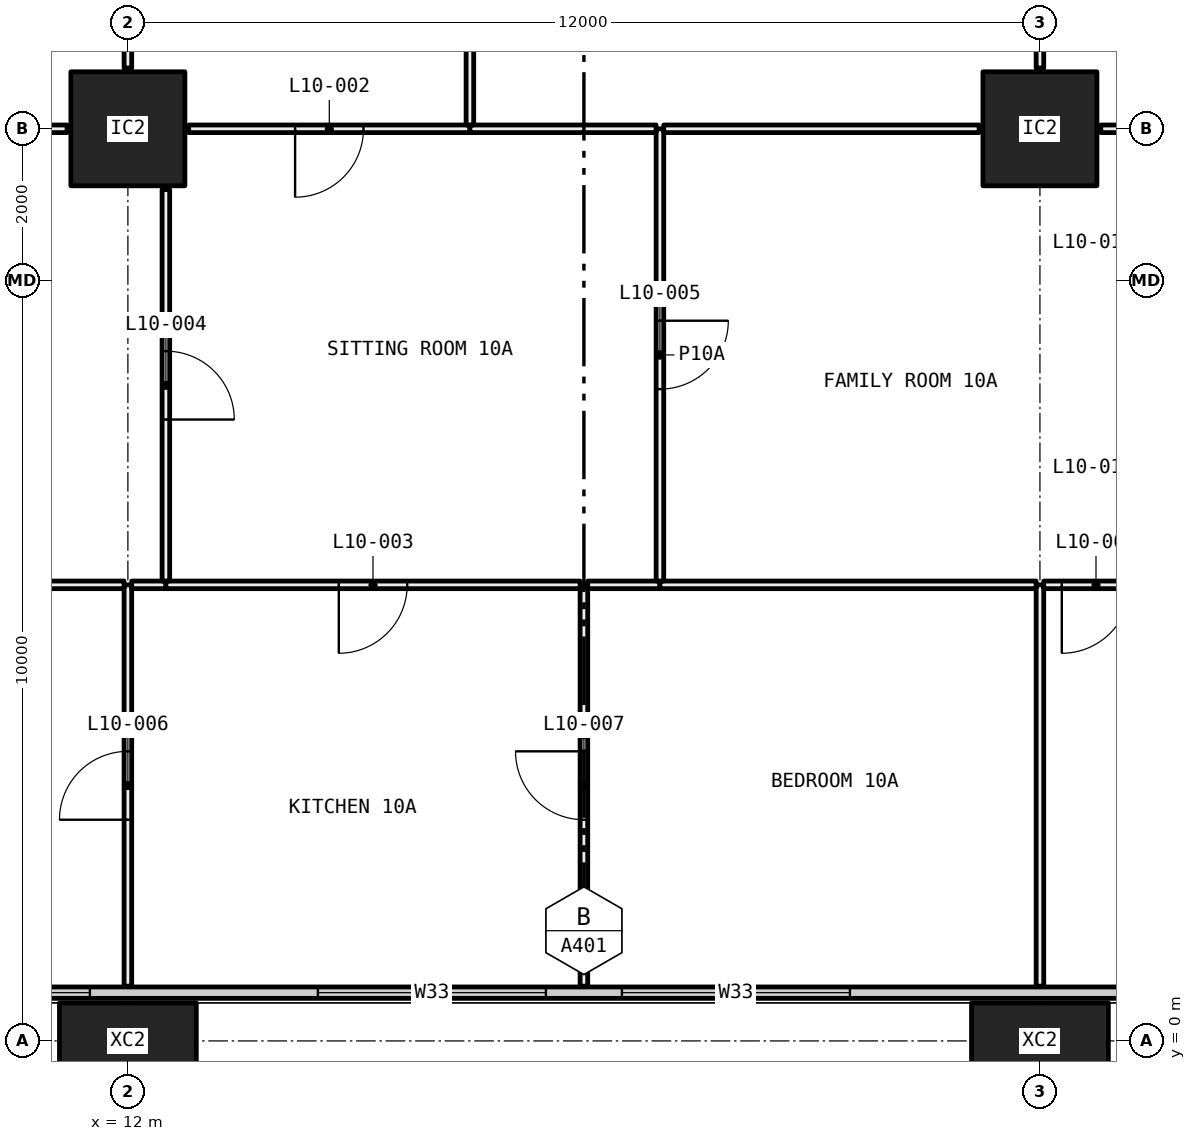
"""IFC4 building model, lengths in metres.
Left out: names, types, materials, properties, quantities, classifications, styles, units other than length and angle.
Written with IfcOpenShell. Run it as: python <this file> out.ifc"""

import sys

from ifc_helpers import new_model, si_unit, direction, frame, frame_2d, origin, origin_2d, place, context, subcontext, project, spatial, rectangle, hollow_rectangle, extrude, element, fill, save


model = new_model("IFC4")
c1 = context("Model", 3, precision=1e-05, world=origin(), true_north=direction((0.0, 1.0)))
c2 = subcontext(c1, "Body", "Model", "MODEL_VIEW")
j1 = project(units=[si_unit("LENGTHUNIT", "METRE"), si_unit("PLANEANGLEUNIT", "RADIAN")], contexts=[c1])
p1 = place(None, origin())
s1 = spatial("IfcSite", under=j1, at=p1, CompositionType="ELEMENT")
p2 = place(p1, origin())
s2 = spatial("IfcBuilding", under=s1, at=p2, CompositionType="ELEMENT")
p3 = place(p2, frame((0.0, 0.0, 47.25)))
s3 = spatial("IfcBuildingStorey", under=s2, at=p3, CompositionType="ELEMENT", Elevation=47.25)
p4 = place(p3, frame((12.0, 0.0, -0.4), z_axis=(0.0, 0.0, 1.0), x_axis=(1.0, 0.0, 0.0)))
e1 = element("IfcColumn", 1, at=p4, inside=s3, PredefinedType="COLUMN", context=c2, shape_type="SweptSolid", body=[
    extrude(hollow_rectangle(XDim=1.8, YDim=1.0, WallThickness=0.07, at=origin_2d()), origin(), (0.0, 0.0, 1.0), 3.45),
])
p5 = place(p3, frame((12.0, 12.0, 0.0), z_axis=(0.0, 0.0, 1.0), x_axis=(1.0, 0.0, 0.0)))
e2 = element("IfcColumn", 2, at=p5, inside=s3, PredefinedType="COLUMN", context=c2, shape_type="SweptSolid", body=[
    extrude(hollow_rectangle(XDim=1.5, YDim=1.5, WallThickness=0.065, at=origin_2d()), origin(), (0.0, 0.0, 1.0), 3.05),
])
p6 = place(p3, frame((24.0, 0.0, -0.4), z_axis=(0.0, 0.0, 1.0), x_axis=(1.0, 0.0, 0.0)))
e3 = element("IfcColumn", 3, at=p6, inside=s3, PredefinedType="COLUMN", context=c2, shape_type="SweptSolid", body=[
    extrude(hollow_rectangle(XDim=1.8, YDim=1.0, WallThickness=0.07, at=origin_2d()), origin(), (0.0, 0.0, 1.0), 3.45),
])
p7 = place(p3, frame((24.0, 12.0, 0.0), z_axis=(0.0, 0.0, 1.0), x_axis=(1.0, 0.0, 0.0)))
e4 = element("IfcColumn", 4, at=p7, inside=s3, PredefinedType="COLUMN", context=c2, shape_type="SweptSolid", body=[
    extrude(hollow_rectangle(XDim=1.5, YDim=1.5, WallThickness=0.065, at=origin_2d()), origin(), (0.0, 0.0, 1.0), 3.05),
])
p8 = place(p3, frame((6.56, 0.635, 0.0), z_axis=(0.0, 0.0, 1.0), x_axis=(1.0, 0.0, 0.0)))
e5 = element("IfcWall", 5, at=p8, inside=s3, PredefinedType="ELEMENTEDWALL", context=c2, shape_type="SweptSolid", body=[
    extrude(rectangle(XDim=58.88, YDim=0.15, at=frame_2d((29.44, 0.0))), origin(), (0.0, 0.0, 1.0), 3.05),
])
p9 = place(p8, frame((0.44, 0.0, 0.45)))
e6 = element("IfcOpeningElement", 6, at=p9, cuts=e5, PredefinedType="OPENING", context=c2, shape_type="SweptSolid", body=[
    extrude(rectangle(XDim=4.5, YDim=2.55, at=frame_2d((2.25, 1.275))), frame((0.0, 0.085, 0.0), z_axis=(0.0, -1.0, 0.0), x_axis=(1.0, 0.0, 0.0)), (0.0, 0.0, 1.0), 0.17),
])
p10 = place(p8, frame((7.94, 0.0, 0.45)))
e7 = element("IfcOpeningElement", 7, at=p10, cuts=e5, PredefinedType="OPENING", context=c2, shape_type="SweptSolid", body=[
    extrude(rectangle(XDim=3.0, YDim=2.55, at=frame_2d((1.5, 1.275))), frame((0.0, 0.085, 0.0), z_axis=(0.0, -1.0, 0.0), x_axis=(1.0, 0.0, 0.0)), (0.0, 0.0, 1.0), 0.17),
])
p11 = place(p8, frame((11.94, 0.0, 0.45)))
e8 = element("IfcOpeningElement", 8, at=p11, cuts=e5, PredefinedType="OPENING", context=c2, shape_type="SweptSolid", body=[
    extrude(rectangle(XDim=3.0, YDim=2.55, at=frame_2d((1.5, 1.275))), frame((0.0, 0.085, 0.0), z_axis=(0.0, -1.0, 0.0), x_axis=(1.0, 0.0, 0.0)), (0.0, 0.0, 1.0), 0.17),
])
p12 = place(p8, frame((19.94, 0.0, 0.45)))
e9 = element("IfcOpeningElement", 9, at=p12, cuts=e5, PredefinedType="OPENING", context=c2, shape_type="SweptSolid", body=[
    extrude(rectangle(XDim=3.0, YDim=2.55, at=frame_2d((1.5, 1.275))), frame((0.0, 0.085, 0.0), z_axis=(0.0, -1.0, 0.0), x_axis=(1.0, 0.0, 0.0)), (0.0, 0.0, 1.0), 0.17),
])
p13 = place(p8, frame((23.94, 0.0, 0.45)))
e10 = element("IfcOpeningElement", 10, at=p13, cuts=e5, PredefinedType="OPENING", context=c2, shape_type="SweptSolid", body=[
    extrude(rectangle(XDim=2.0, YDim=2.55, at=frame_2d((1.0, 1.275))), frame((0.0, 0.085, 0.0), z_axis=(0.0, -1.0, 0.0), x_axis=(1.0, 0.0, 0.0)), (0.0, 0.0, 1.0), 0.17),
])
p14 = place(p8, frame((31.94, 0.0, 0.45)))
e11 = element("IfcOpeningElement", 11, at=p14, cuts=e5, PredefinedType="OPENING", context=c2, shape_type="SweptSolid", body=[
    extrude(rectangle(XDim=3.0, YDim=2.55, at=frame_2d((1.5, 1.275))), frame((0.0, 0.085, 0.0), z_axis=(0.0, -1.0, 0.0), x_axis=(1.0, 0.0, 0.0)), (0.0, 0.0, 1.0), 0.17),
])
p15 = place(p8, frame((35.94, 0.0, 0.45)))
e12 = element("IfcOpeningElement", 12, at=p15, cuts=e5, PredefinedType="OPENING", context=c2, shape_type="SweptSolid", body=[
    extrude(rectangle(XDim=3.0, YDim=2.55, at=frame_2d((1.5, 1.275))), frame((0.0, 0.085, 0.0), z_axis=(0.0, -1.0, 0.0), x_axis=(1.0, 0.0, 0.0)), (0.0, 0.0, 1.0), 0.17),
])
p16 = place(p8, frame((43.94, 0.0, 0.45)))
e13 = element("IfcOpeningElement", 13, at=p16, cuts=e5, PredefinedType="OPENING", context=c2, shape_type="SweptSolid", body=[
    extrude(rectangle(XDim=3.0, YDim=2.55, at=frame_2d((1.5, 1.275))), frame((0.0, 0.085, 0.0), z_axis=(0.0, -1.0, 0.0), x_axis=(1.0, 0.0, 0.0)), (0.0, 0.0, 1.0), 0.17),
])
p17 = place(p8, frame((47.94, 0.0, 0.45)))
e14 = element("IfcOpeningElement", 14, at=p17, cuts=e5, PredefinedType="OPENING", context=c2, shape_type="SweptSolid", body=[
    extrude(rectangle(XDim=2.0, YDim=2.55, at=frame_2d((1.0, 1.275))), frame((0.0, 0.085, 0.0), z_axis=(0.0, -1.0, 0.0), x_axis=(1.0, 0.0, 0.0)), (0.0, 0.0, 1.0), 0.17),
])
p18 = place(p8, frame((53.94, 0.0, 0.45)))
e15 = element("IfcOpeningElement", 15, at=p18, cuts=e5, PredefinedType="OPENING", context=c2, shape_type="SweptSolid", body=[
    extrude(rectangle(XDim=4.5, YDim=2.55, at=frame_2d((2.25, 1.275))), frame((0.0, 0.085, 0.0), z_axis=(0.0, -1.0, 0.0), x_axis=(1.0, 0.0, 0.0)), (0.0, 0.0, 1.0), 0.17),
])
p19 = place(p3, frame((12.0, 0.72, 0.0), z_axis=(0.0, 0.0, 1.0), x_axis=(0.0, 1.0, 0.0)))
e16 = element("IfcWall", 16, at=p19, inside=s3, PredefinedType="PARTITIONING", context=c2, shape_type="SweptSolid", body=[
    extrude(rectangle(XDim=5.28, YDim=0.1, at=frame_2d((2.64, 0.0))), origin(), (0.0, 0.0, 1.0), 2.45),
])
p20 = place(p19, frame((2.19, 0.0, 0.0)))
e17 = element("IfcOpeningElement", 17, at=p20, cuts=e16, PredefinedType="OPENING", context=c2, shape_type="SweptSolid", body=[
    extrude(rectangle(XDim=0.9, YDim=2.1, at=frame_2d((0.45, 1.05))), frame((0.0, 0.06, 0.0), z_axis=(0.0, -1.0, 0.0), x_axis=(1.0, 0.0, 0.0)), (0.0, 0.0, 1.0), 0.12),
])
p21 = place(p3, frame((11.95, 6.0, 0.0), z_axis=(0.0, 0.0, 1.0), x_axis=(-1.0, 0.0, 0.0)))
e18 = element("IfcWall", 18, at=p21, inside=s3, PredefinedType="PARTITIONING", context=c2, shape_type="SweptSolid", body=[
    extrude(rectangle(XDim=5.23, YDim=0.1, at=frame_2d((2.615, 0.0))), origin(), (0.0, 0.0, 1.0), 2.45),
])
p22 = place(p3, frame((18.0, 0.72, 0.0), z_axis=(0.0, 0.0, 1.0), x_axis=(0.0, 1.0, 0.0)))
e19 = element("IfcWall", 19, at=p22, inside=s3, PredefinedType="PARTITIONING", context=c2, shape_type="SweptSolid", body=[
    extrude(rectangle(XDim=5.28, YDim=0.1, at=frame_2d((2.64, 0.0))), origin(), (0.0, 0.0, 1.0), 3.05),
])
p23 = place(p22, frame((2.19, 0.0, 0.0)))
e20 = element("IfcOpeningElement", 20, at=p23, cuts=e19, PredefinedType="OPENING", context=c2, shape_type="SweptSolid", body=[
    extrude(rectangle(XDim=0.9, YDim=2.1, at=frame_2d((0.45, 1.05))), frame((0.0, 0.06, 0.0), z_axis=(0.0, -1.0, 0.0), x_axis=(1.0, 0.0, 0.0)), (0.0, 0.0, 1.0), 0.12),
])
p24 = place(p3, frame((12.5, 6.0, 0.0), z_axis=(0.0, 0.0, 1.0), x_axis=(-1.0, 0.0, 0.0)))
e21 = element("IfcWall", 21, at=p24, inside=s3, PredefinedType="PARTITIONING", context=c2, shape_type="SweptSolid", body=[
    extrude(rectangle(XDim=0.45, YDim=0.1, at=frame_2d((0.225, 0.0))), origin(), (0.0, 0.0, 1.0), 2.45),
])
p25 = place(p3, frame((17.95, 6.0, 0.0), z_axis=(0.0, 0.0, 1.0), x_axis=(-1.0, 0.0, 0.0)))
e22 = element("IfcWall", 22, at=p25, inside=s3, PredefinedType="PARTITIONING", context=c2, shape_type="SweptSolid", body=[
    extrude(rectangle(XDim=5.45, YDim=0.1, at=frame_2d((2.725, 0.0))), origin(), (0.0, 0.0, 1.0), 3.05),
])
p26 = place(p25, frame((2.275, 0.0, 0.0)))
e23 = element("IfcOpeningElement", 23, at=p26, cuts=e22, PredefinedType="OPENING", context=c2, shape_type="SweptSolid", body=[
    extrude(rectangle(XDim=0.9, YDim=2.1, at=frame_2d((0.45, 1.05))), frame((0.0, 0.06, 0.0), z_axis=(0.0, -1.0, 0.0), x_axis=(1.0, 0.0, 0.0)), (0.0, 0.0, 1.0), 0.12),
])
p27 = place(p3, frame((24.0, 0.72, 0.0), z_axis=(0.0, 0.0, 1.0), x_axis=(0.0, 1.0, 0.0)))
e24 = element("IfcWall", 24, at=p27, inside=s3, PredefinedType="PARTITIONING", context=c2, shape_type="SweptSolid", body=[
    extrude(rectangle(XDim=5.28, YDim=0.1, at=frame_2d((2.64, 0.0))), origin(), (0.0, 0.0, 1.0), 2.45),
])
p28 = place(p3, frame((19.0, 6.0, 0.0), z_axis=(0.0, 0.0, 1.0), x_axis=(-1.0, 0.0, 0.0)))
e25 = element("IfcWall", 25, at=p28, inside=s3, PredefinedType="PARTITIONING", context=c2, shape_type="SweptSolid", body=[
    extrude(rectangle(XDim=0.95, YDim=0.1, at=frame_2d((0.475, 0.0))), origin(), (0.0, 0.0, 1.0), 3.05),
])
p29 = place(p3, frame((23.95, 6.0, 0.0), z_axis=(0.0, 0.0, 1.0), x_axis=(-1.0, 0.0, 0.0)))
e26 = element("IfcWall", 26, at=p29, inside=s3, PredefinedType="PARTITIONING", context=c2, shape_type="SweptSolid", body=[
    extrude(rectangle(XDim=4.95, YDim=0.1, at=frame_2d((2.475, 0.0))), origin(), (0.0, 0.0, 1.0), 2.45),
])
p30 = place(p3, frame((25.425, 6.0, 0.0), z_axis=(0.0, 0.0, 1.0), x_axis=(-1.0, 0.0, 0.0)))
e27 = element("IfcWall", 27, at=p30, inside=s3, PredefinedType="PARTITIONING", context=c2, shape_type="SweptSolid", body=[
    extrude(rectangle(XDim=1.375, YDim=0.1, at=frame_2d((0.688, 0.0))), origin(), (0.0, 0.0, 1.0), 2.45),
])
p31 = place(p30, frame((0.238, 0.0, 0.0)))
e28 = element("IfcOpeningElement", 28, at=p31, cuts=e27, PredefinedType="OPENING", context=c2, shape_type="SweptSolid", body=[
    extrude(rectangle(XDim=0.9, YDim=2.1, at=frame_2d((0.45, 1.05))), frame((0.0, 0.06, 0.0), z_axis=(0.0, -1.0, 0.0), x_axis=(1.0, 0.0, 0.0)), (0.0, 0.0, 1.0), 0.12),
])
p32 = place(p3, frame((12.5, 6.05, 0.0), z_axis=(0.0, 0.0, 1.0), x_axis=(0.0, 1.0, 0.0)))
e29 = element("IfcWall", 29, at=p32, inside=s3, PredefinedType="PARTITIONING", context=c2, shape_type="SweptSolid", body=[
    extrude(rectangle(XDim=5.15, YDim=0.1, at=frame_2d((2.575, 0.0))), origin(), (0.0, 0.0, 1.0), 3.05),
])
p33 = place(p32, frame((2.125, 0.0, 0.0)))
e30 = element("IfcOpeningElement", 30, at=p33, cuts=e29, PredefinedType="OPENING", context=c2, shape_type="SweptSolid", body=[
    extrude(rectangle(XDim=0.9, YDim=2.1, at=frame_2d((0.45, 1.05))), frame((0.0, 0.06, 0.0), z_axis=(0.0, -1.0, 0.0), x_axis=(1.0, 0.0, 0.0)), (0.0, 0.0, 1.0), 0.12),
])
p34 = place(p3, frame((11.2, 12.0, 0.0), z_axis=(0.0, 0.0, 1.0), x_axis=(-1.0, 0.0, 0.0)))
e31 = element("IfcWall", 31, at=p34, inside=s3, PredefinedType="PARTITIONING", context=c2, shape_type="SweptSolid", body=[
    extrude(rectangle(XDim=5.15, YDim=0.1, at=frame_2d((2.575, 0.0))), origin(), (0.0, 0.0, 1.0), 2.45),
])
p35 = place(p34, frame((2.125, 0.0, 0.0)))
e32 = element("IfcOpeningElement", 32, at=p35, cuts=e31, PredefinedType="OPENING", context=c2, shape_type="SweptSolid", body=[
    extrude(rectangle(XDim=0.9, YDim=2.1, at=frame_2d((0.45, 1.05))), frame((0.0, 0.06, 0.0), z_axis=(0.0, -1.0, 0.0), x_axis=(1.0, 0.0, 0.0)), (0.0, 0.0, 1.0), 0.12),
])
p36 = place(p3, frame((19.0, 6.05, 0.0), z_axis=(0.0, 0.0, 1.0), x_axis=(0.0, 1.0, 0.0)))
e33 = element("IfcWall", 33, at=p36, inside=s3, PredefinedType="PARTITIONING", context=c2, shape_type="SweptSolid", body=[
    extrude(rectangle(XDim=5.95, YDim=0.1, at=frame_2d((2.975, 0.0))), origin(), (0.0, 0.0, 1.0), 2.45),
])
p37 = place(p36, frame((2.525, 0.0, 0.0)))
e34 = element("IfcOpeningElement", 34, at=p37, cuts=e33, PredefinedType="OPENING", context=c2, shape_type="SweptSolid", body=[
    extrude(rectangle(XDim=0.9, YDim=2.1, at=frame_2d((0.45, 1.05))), frame((0.0, 0.06, 0.0), z_axis=(0.0, -1.0, 0.0), x_axis=(1.0, 0.0, 0.0)), (0.0, 0.0, 1.0), 0.12),
])
p38 = place(p3, frame((16.5, 12.0, 0.0), z_axis=(0.0, 0.0, 1.0), x_axis=(-1.0, 0.0, 0.0)))
e35 = element("IfcWall", 35, at=p38, inside=s3, PredefinedType="PARTITIONING", context=c2, shape_type="SweptSolid", body=[
    extrude(rectangle(XDim=3.7, YDim=0.1, at=frame_2d((1.85, 0.0))), origin(), (0.0, 0.0, 1.0), 2.45),
])
p39 = place(p38, frame((1.4, 0.0, 0.0)))
e36 = element("IfcOpeningElement", 36, at=p39, cuts=e35, PredefinedType="OPENING", context=c2, shape_type="SweptSolid", body=[
    extrude(rectangle(XDim=0.9, YDim=2.1, at=frame_2d((0.45, 1.05))), frame((0.0, 0.06, 0.0), z_axis=(0.0, -1.0, 0.0), x_axis=(1.0, 0.0, 0.0)), (0.0, 0.0, 1.0), 0.12),
])
p40 = place(p3, frame((18.95, 12.0, 0.0), z_axis=(0.0, 0.0, 1.0), x_axis=(-1.0, 0.0, 0.0)))
e37 = element("IfcWall", 37, at=p40, inside=s3, PredefinedType="PARTITIONING", context=c2, shape_type="SweptSolid", body=[
    extrude(rectangle(XDim=2.45, YDim=0.1, at=frame_2d((1.225, 0.0))), origin(), (0.0, 0.0, 1.0), 2.45),
])
p41 = place(p3, frame((23.2, 12.0, 0.0), z_axis=(0.0, 0.0, 1.0), x_axis=(-1.0, 0.0, 0.0)))
e38 = element("IfcWall", 38, at=p41, inside=s3, PredefinedType="PARTITIONING", context=c2, shape_type="SweptSolid", body=[
    extrude(rectangle(XDim=4.15, YDim=0.1, at=frame_2d((2.075, 0.0))), origin(), (0.0, 0.0, 1.0), 2.45),
])
p42 = place(p3, frame((25.425, 12.0, 0.0), z_axis=(0.0, 0.0, 1.0), x_axis=(-1.0, 0.0, 0.0)))
e39 = element("IfcWall", 39, at=p42, inside=s3, PredefinedType="PARTITIONING", context=c2, shape_type="SweptSolid", body=[
    extrude(rectangle(XDim=0.625, YDim=0.1, at=frame_2d((0.312, 0.0))), origin(), (0.0, 0.0, 1.0), 2.45),
])
p43 = place(p3, frame((12.0, 12.8, 0.0), z_axis=(0.0, 0.0, 1.0), x_axis=(0.0, 1.0, 0.0)))
e40 = element("IfcWall", 40, at=p43, inside=s3, PredefinedType="PARTITIONING", context=c2, shape_type="SweptSolid", body=[
    extrude(rectangle(XDim=5.1, YDim=0.1, at=frame_2d((2.55, 0.0))), origin(), (0.0, 0.0, 1.0), 3.05),
])
p44 = place(p3, frame((16.5, 12.05, 0.0), z_axis=(0.0, 0.0, 1.0), x_axis=(0.0, 1.0, 0.0)))
e41 = element("IfcWall", 41, at=p44, inside=s3, PredefinedType="PARTITIONING", context=c2, shape_type="SweptSolid", body=[
    extrude(rectangle(XDim=5.85, YDim=0.1, at=frame_2d((2.925, 0.0))), origin(), (0.0, 0.0, 1.0), 2.45),
])
p45 = place(p44, frame((2.475, 0.0, 0.0)))
e42 = element("IfcOpeningElement", 42, at=p45, cuts=e41, PredefinedType="OPENING", context=c2, shape_type="SweptSolid", body=[
    extrude(rectangle(XDim=0.9, YDim=2.1, at=frame_2d((0.45, 1.05))), frame((0.0, 0.06, 0.0), z_axis=(0.0, -1.0, 0.0), x_axis=(1.0, 0.0, 0.0)), (0.0, 0.0, 1.0), 0.12),
])
p46 = place(p3, frame((24.0, 12.8, 0.0), z_axis=(0.0, 0.0, 1.0), x_axis=(0.0, 1.0, 0.0)))
e43 = element("IfcWall", 43, at=p46, inside=s3, PredefinedType="PARTITIONING", context=c2, shape_type="SweptSolid", body=[
    extrude(rectangle(XDim=5.1, YDim=0.1, at=frame_2d((2.55, 0.0))), origin(), (0.0, 0.0, 1.0), 3.05),
])
p47 = place(p46, frame((2.1, 0.0, 0.0)))
e44 = element("IfcOpeningElement", 44, at=p47, cuts=e43, PredefinedType="OPENING", context=c2, shape_type="SweptSolid", body=[
    extrude(rectangle(XDim=0.9, YDim=2.1, at=frame_2d((0.45, 1.05))), frame((0.0, 0.06, 0.0), z_axis=(0.0, -1.0, 0.0), x_axis=(1.0, 0.0, 0.0)), (0.0, 0.0, 1.0), 0.12),
])
p48 = place(p9, origin())
e45 = element("IfcWindow", 45, at=p48, inside=s3, PartitioningType="SINGLE_PANEL", PredefinedType="WINDOW", context=c2, shape_type="SweptSolid", body=[
    extrude(rectangle(XDim=4.5, YDim=2.55, at=frame_2d((2.25, 1.275))), frame((0.0, 0.03, 0.0), z_axis=(0.0, -1.0, 0.0), x_axis=(1.0, 0.0, 0.0)), (0.0, 0.0, 1.0), 0.06),
])
fill(e6, e45)
p49 = place(p10, origin())
e46 = element("IfcWindow", 46, at=p49, inside=s3, PartitioningType="SINGLE_PANEL", PredefinedType="WINDOW", context=c2, shape_type="SweptSolid", body=[
    extrude(rectangle(XDim=3.0, YDim=2.55, at=frame_2d((1.5, 1.275))), frame((0.0, 0.03, 0.0), z_axis=(0.0, -1.0, 0.0), x_axis=(1.0, 0.0, 0.0)), (0.0, 0.0, 1.0), 0.06),
])
fill(e7, e46)
p50 = place(p11, origin())
e47 = element("IfcWindow", 47, at=p50, inside=s3, PartitioningType="SINGLE_PANEL", PredefinedType="WINDOW", context=c2, shape_type="SweptSolid", body=[
    extrude(rectangle(XDim=3.0, YDim=2.55, at=frame_2d((1.5, 1.275))), frame((0.0, 0.03, 0.0), z_axis=(0.0, -1.0, 0.0), x_axis=(1.0, 0.0, 0.0)), (0.0, 0.0, 1.0), 0.06),
])
fill(e8, e47)
p51 = place(p39, origin())
e48 = element("IfcDoor", 48, at=p51, inside=s3, OperationType="SINGLE_SWING_LEFT", PredefinedType="DOOR", context=c2, shape_type="SweptSolid", body=[
    extrude(rectangle(XDim=0.9, YDim=2.1, at=frame_2d((0.45, 1.05))), frame((0.0, 0.025, 0.0), z_axis=(0.0, -1.0, 0.0), x_axis=(1.0, 0.0, 0.0)), (0.0, 0.0, 1.0), 0.05),
])
fill(e36, e48)
p52 = place(p26, origin())
e49 = element("IfcDoor", 49, at=p52, inside=s3, OperationType="SINGLE_SWING_LEFT", PredefinedType="DOOR", context=c2, shape_type="SweptSolid", body=[
    extrude(rectangle(XDim=0.9, YDim=2.1, at=frame_2d((0.45, 1.05))), frame((0.0, 0.025, 0.0), z_axis=(0.0, -1.0, 0.0), x_axis=(1.0, 0.0, 0.0)), (0.0, 0.0, 1.0), 0.05),
])
fill(e23, e49)
p53 = place(p33, frame((0.9, 0.0, 0.0), x_axis=(-1.0, 0.0, 0.0)))
e50 = element("IfcDoor", 50, at=p53, inside=s3, OperationType="SINGLE_SWING_LEFT", PredefinedType="DOOR", context=c2, shape_type="SweptSolid", body=[
    extrude(rectangle(XDim=0.9, YDim=2.1, at=frame_2d((0.45, 1.05))), frame((0.0, 0.025, 0.0), z_axis=(0.0, -1.0, 0.0), x_axis=(1.0, 0.0, 0.0)), (0.0, 0.0, 1.0), 0.05),
])
fill(e30, e50)
p54 = place(p37, frame((0.9, 0.0, 0.0), x_axis=(-1.0, 0.0, 0.0)))
e51 = element("IfcDoor", 51, at=p54, inside=s3, OperationType="SINGLE_SWING_RIGHT", PredefinedType="DOOR", context=c2, shape_type="SweptSolid", body=[
    extrude(rectangle(XDim=0.9, YDim=2.1, at=frame_2d((0.45, 1.05))), frame((0.0, 0.025, 0.0), z_axis=(0.0, -1.0, 0.0), x_axis=(1.0, 0.0, 0.0)), (0.0, 0.0, 1.0), 0.05),
])
fill(e34, e51)
p55 = place(p20, origin())
e52 = element("IfcDoor", 52, at=p55, inside=s3, OperationType="SINGLE_SWING_RIGHT", PredefinedType="DOOR", context=c2, shape_type="SweptSolid", body=[
    extrude(rectangle(XDim=0.9, YDim=2.1, at=frame_2d((0.45, 1.05))), frame((0.0, 0.025, 0.0), z_axis=(0.0, -1.0, 0.0), x_axis=(1.0, 0.0, 0.0)), (0.0, 0.0, 1.0), 0.05),
])
fill(e17, e52)
p56 = place(p23, origin())
e53 = element("IfcDoor", 53, at=p56, inside=s3, OperationType="SINGLE_SWING_LEFT", PredefinedType="DOOR", context=c2, shape_type="SweptSolid", body=[
    extrude(rectangle(XDim=0.9, YDim=2.1, at=frame_2d((0.45, 1.05))), frame((0.0, 0.025, 0.0), z_axis=(0.0, -1.0, 0.0), x_axis=(1.0, 0.0, 0.0)), (0.0, 0.0, 1.0), 0.05),
])
fill(e20, e53)
p57 = place(p31, origin())
e54 = element("IfcDoor", 54, at=p57, inside=s3, OperationType="SINGLE_SWING_LEFT", PredefinedType="DOOR", context=c2, shape_type="SweptSolid", body=[
    extrude(rectangle(XDim=0.9, YDim=2.1, at=frame_2d((0.45, 1.05))), frame((0.0, 0.025, 0.0), z_axis=(0.0, -1.0, 0.0), x_axis=(1.0, 0.0, 0.0)), (0.0, 0.0, 1.0), 0.05),
])
fill(e28, e54)
save(model, sys.argv[1])
